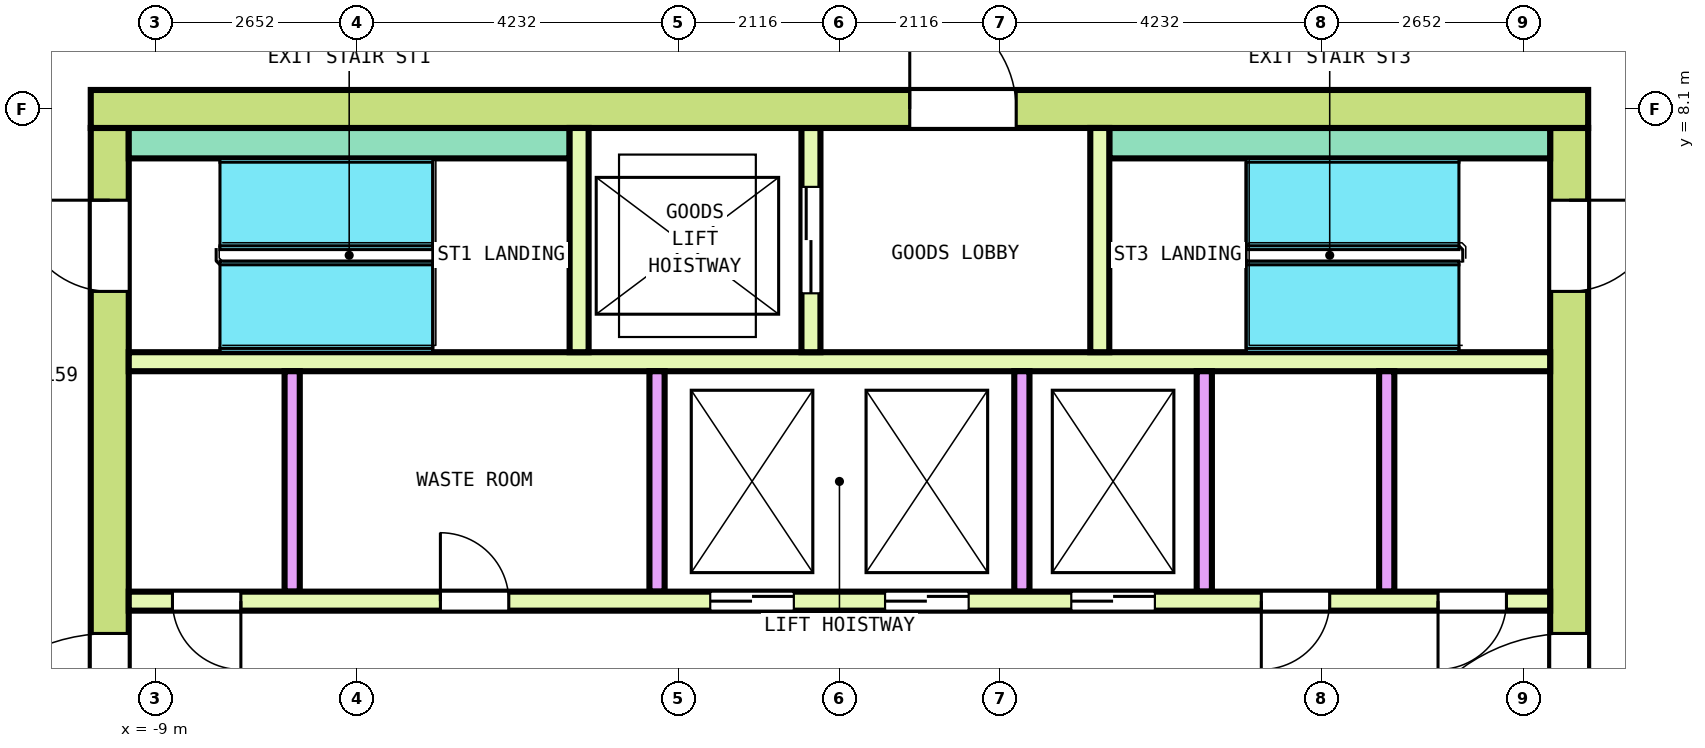
"""IFC4 building model, lengths in metres.
Left out: names, types, materials, properties, quantities, classifications, styles, units other than length and angle.
Written with IfcOpenShell. Run it as: python <this file> out.ifc"""

import sys

from ifc_helpers import new_model, si_unit, direction, frame, frame_2d, origin, place, context, subcontext, project, spatial, rectangle, extrude, element, fill, save


model = new_model("IFC4")
c1 = context("Model", 3, precision=1e-05, world=origin(), true_north=direction((0.0, 1.0)))
c2 = subcontext(c1, "Body", "Model", "MODEL_VIEW")
j1 = project(units=[si_unit("LENGTHUNIT", "METRE"), si_unit("PLANEANGLEUNIT", "RADIAN")], contexts=[c1])
p1 = place(None, origin())
s1 = spatial("IfcSite", under=j1, at=p1, CompositionType="ELEMENT")
p2 = place(p1, origin())
s2 = spatial("IfcBuilding", under=s1, at=p2, CompositionType="ELEMENT")
p3 = place(p2, frame((0.0, 0.0, 275.0)))
s3 = spatial("IfcBuildingStorey", under=s2, at=p3, CompositionType="ELEMENT", Elevation=275.0)
p4 = place(p3, frame((-9.85, 8.1, 0.0), z_axis=(0.0, 0.0, 1.0), x_axis=(1.0, 0.0, 0.0)))
e1 = element("IfcWall", 1, at=p4, inside=s3, PredefinedType="SHEAR", context=c2, shape_type="SweptSolid", body=[
    extrude(rectangle(XDim=19.7, YDim=0.5, at=frame_2d((9.85, 0.0))), origin(), (0.0, 0.0, 1.0), 3.7),
])
p5 = place(p4, frame((10.775, 0.0, 0.0)))
e2 = element("IfcOpeningElement", 2, at=p5, cuts=e1, PredefinedType="OPENING", context=c2, shape_type="SweptSolid", body=[
    extrude(rectangle(XDim=1.4, YDim=2.1, at=frame_2d((0.7, 1.05))), frame((0.0, 0.26, 0.0), z_axis=(0.0, -1.0, 0.0), x_axis=(1.0, 0.0, 0.0)), (0.0, 0.0, 1.0), 0.52),
])
p6 = place(p3, frame((-9.6, -7.85, 0.0), z_axis=(0.0, 0.0, 1.0), x_axis=(0.0, 1.0, 0.0)))
e3 = element("IfcWall", 3, at=p6, inside=s3, PredefinedType="SHEAR", context=c2, shape_type="SweptSolid", body=[
    extrude(rectangle(XDim=15.7, YDim=0.5, at=frame_2d((7.85, 0.0))), origin(), (0.0, 0.0, 1.0), 3.7),
])
p7 = place(p6, frame((6.65, 0.0, 0.0)))
e4 = element("IfcOpeningElement", 4, at=p7, cuts=e3, PredefinedType="OPENING", context=c2, shape_type="SweptSolid", body=[
    extrude(rectangle(XDim=2.4, YDim=2.1, at=frame_2d((1.2, 1.05))), frame((0.0, 0.26, 0.0), z_axis=(0.0, -1.0, 0.0), x_axis=(1.0, 0.0, 0.0)), (0.0, 0.0, 1.0), 0.52),
])
p8 = place(p6, frame((13.55, 0.0, 0.0)))
e5 = element("IfcOpeningElement", 5, at=p8, cuts=e3, PredefinedType="OPENING", context=c2, shape_type="SweptSolid", body=[
    extrude(rectangle(XDim=1.2, YDim=2.1, at=frame_2d((0.6, 1.05))), frame((0.0, 0.26, 0.0), z_axis=(0.0, -1.0, 0.0), x_axis=(1.0, 0.0, 0.0)), (0.0, 0.0, 1.0), 0.52),
])
p9 = place(p6, frame((0.95, 0.0, 0.0)))
e6 = element("IfcOpeningElement", 6, at=p9, cuts=e3, PredefinedType="OPENING", context=c2, shape_type="SweptSolid", body=[
    extrude(rectangle(XDim=1.2, YDim=2.1, at=frame_2d((0.6, 1.05))), frame((0.0, 0.26, 0.0), z_axis=(0.0, -1.0, 0.0), x_axis=(1.0, 0.0, 0.0)), (0.0, 0.0, 1.0), 0.52),
])
p10 = place(p3, frame((9.6, -7.85, 0.0), z_axis=(0.0, 0.0, 1.0), x_axis=(0.0, 1.0, 0.0)))
e7 = element("IfcWall", 7, at=p10, inside=s3, PredefinedType="SHEAR", context=c2, shape_type="SweptSolid", body=[
    extrude(rectangle(XDim=15.7, YDim=0.5, at=frame_2d((7.85, 0.0))), origin(), (0.0, 0.0, 1.0), 3.7),
])
p11 = place(p10, frame((6.65, 0.0, 0.0)))
e8 = element("IfcOpeningElement", 8, at=p11, cuts=e7, PredefinedType="OPENING", context=c2, shape_type="SweptSolid", body=[
    extrude(rectangle(XDim=2.4, YDim=2.1, at=frame_2d((1.2, 1.05))), frame((0.0, 0.26, 0.0), z_axis=(0.0, -1.0, 0.0), x_axis=(1.0, 0.0, 0.0)), (0.0, 0.0, 1.0), 0.52),
])
p12 = place(p10, frame((13.55, 0.0, 0.0)))
e9 = element("IfcOpeningElement", 9, at=p12, cuts=e7, PredefinedType="OPENING", context=c2, shape_type="SweptSolid", body=[
    extrude(rectangle(XDim=1.2, YDim=2.1, at=frame_2d((0.6, 1.05))), frame((0.0, 0.26, 0.0), z_axis=(0.0, -1.0, 0.0), x_axis=(1.0, 0.0, 0.0)), (0.0, 0.0, 1.0), 0.52),
])
p13 = place(p10, frame((1.05, 0.0, 0.0)))
e10 = element("IfcOpeningElement", 10, at=p13, cuts=e7, PredefinedType="OPENING", context=c2, shape_type="SweptSolid", body=[
    extrude(rectangle(XDim=1.0, YDim=2.1, at=frame_2d((0.5, 1.05))), frame((0.0, 0.26, 0.0), z_axis=(0.0, -1.0, 0.0), x_axis=(1.0, 0.0, 0.0)), (0.0, 0.0, 1.0), 0.52),
])
p14 = place(p3, frame((-9.35, 1.625, 0.0), z_axis=(0.0, 0.0, 1.0), x_axis=(1.0, 0.0, 0.0)))
e11 = element("IfcWall", 11, at=p14, inside=s3, PredefinedType="SOLIDWALL", context=c2, shape_type="SweptSolid", body=[
    extrude(rectangle(XDim=18.7, YDim=0.25, at=frame_2d((9.35, 0.0))), origin(), (0.0, 0.0, 1.0), 3.7),
])
p15 = place(p14, frame((7.65, 0.0, 0.0)))
e12 = element("IfcOpeningElement", 12, at=p15, cuts=e11, PredefinedType="OPENING", context=c2, shape_type="SweptSolid", body=[
    extrude(rectangle(XDim=1.1, YDim=2.1, at=frame_2d((0.55, 1.05))), frame((0.0, 0.135, 0.0), z_axis=(0.0, -1.0, 0.0), x_axis=(1.0, 0.0, 0.0)), (0.0, 0.0, 1.0), 0.27),
])
p16 = place(p14, frame((9.95, 0.0, 0.0)))
e13 = element("IfcOpeningElement", 13, at=p16, cuts=e11, PredefinedType="OPENING", context=c2, shape_type="SweptSolid", body=[
    extrude(rectangle(XDim=1.1, YDim=2.1, at=frame_2d((0.55, 1.05))), frame((0.0, 0.135, 0.0), z_axis=(0.0, -1.0, 0.0), x_axis=(1.0, 0.0, 0.0)), (0.0, 0.0, 1.0), 0.27),
])
p17 = place(p14, frame((12.4, 0.0, 0.0)))
e14 = element("IfcOpeningElement", 14, at=p17, cuts=e11, PredefinedType="OPENING", context=c2, shape_type="SweptSolid", body=[
    extrude(rectangle(XDim=1.1, YDim=2.1, at=frame_2d((0.55, 1.05))), frame((0.0, 0.135, 0.0), z_axis=(0.0, -1.0, 0.0), x_axis=(1.0, 0.0, 0.0)), (0.0, 0.0, 1.0), 0.27),
])
p18 = place(p14, frame((0.575, 0.0, 0.0)))
e15 = element("IfcOpeningElement", 15, at=p18, cuts=e11, PredefinedType="OPENING", context=c2, shape_type="SweptSolid", body=[
    extrude(rectangle(XDim=0.9, YDim=2.1, at=frame_2d((0.45, 1.05))), frame((0.0, 0.135, 0.0), z_axis=(0.0, -1.0, 0.0), x_axis=(1.0, 0.0, 0.0)), (0.0, 0.0, 1.0), 0.27),
])
p19 = place(p14, frame((4.1, 0.0, 0.0)))
e16 = element("IfcOpeningElement", 16, at=p19, cuts=e11, PredefinedType="OPENING", context=c2, shape_type="SweptSolid", body=[
    extrude(rectangle(XDim=0.9, YDim=2.1, at=frame_2d((0.45, 1.05))), frame((0.0, 0.135, 0.0), z_axis=(0.0, -1.0, 0.0), x_axis=(1.0, 0.0, 0.0)), (0.0, 0.0, 1.0), 0.27),
])
p20 = place(p14, frame((14.9, 0.0, 0.0)))
e17 = element("IfcOpeningElement", 17, at=p20, cuts=e11, PredefinedType="OPENING", context=c2, shape_type="SweptSolid", body=[
    extrude(rectangle(XDim=0.9, YDim=2.1, at=frame_2d((0.45, 1.05))), frame((0.0, 0.135, 0.0), z_axis=(0.0, -1.0, 0.0), x_axis=(1.0, 0.0, 0.0)), (0.0, 0.0, 1.0), 0.27),
])
p21 = place(p14, frame((17.225, 0.0, 0.0)))
e18 = element("IfcOpeningElement", 18, at=p21, cuts=e11, PredefinedType="OPENING", context=c2, shape_type="SweptSolid", body=[
    extrude(rectangle(XDim=0.9, YDim=2.1, at=frame_2d((0.45, 1.05))), frame((0.0, 0.135, 0.0), z_axis=(0.0, -1.0, 0.0), x_axis=(1.0, 0.0, 0.0)), (0.0, 0.0, 1.0), 0.27),
])
p22 = place(p3, frame((-9.35, 4.775, 0.0), z_axis=(0.0, 0.0, 1.0), x_axis=(1.0, 0.0, 0.0)))
e19 = element("IfcWall", 19, at=p22, inside=s3, PredefinedType="SOLIDWALL", context=c2, shape_type="SweptSolid", body=[
    extrude(rectangle(XDim=18.7, YDim=0.25, at=frame_2d((9.35, 0.0))), origin(), (0.0, 0.0, 1.0), 3.7),
])
for number, where, z_axis, x_axis in (
    (20, (-7.2, 1.75, 0.0), (0.0, 0.0, 1.0), (0.0, 1.0, 0.0)),
    (21, (-2.4, 1.75, 0.0), (0.0, 0.0, 1.0), (0.0, 1.0, 0.0)),
    (22, (2.4, 1.75, 0.0), (0.0, 0.0, 1.0), (0.0, 1.0, 0.0)),
    (23, (4.8, 1.75, 0.0), (0.0, 0.0, 1.0), (0.0, 1.0, 0.0)),
    (24, (7.2, 1.75, 0.0), (0.0, 0.0, 1.0), (0.0, 1.0, 0.0)),
):
    element("IfcWall", number, at=place(p3, frame(where, z_axis=z_axis, x_axis=x_axis)), inside=s3, PredefinedType="SOLIDWALL", context=c2, shape_type="SweptSolid", body=[
        extrude(rectangle(XDim=2.9, YDim=0.2, at=frame_2d((1.45, 0.0))), origin(), (0.0, 0.0, 1.0), 3.7),
    ])
for number, where, z_axis, x_axis in (
    (25, (-9.35, 7.65, 0.0), (0.0, 0.0, 1.0), (1.0, 0.0, 0.0)),
    (26, (3.55, 7.65, 0.0), (0.0, 0.0, 1.0), (1.0, 0.0, 0.0)),
):
    element("IfcWall", number, at=place(p3, frame(where, z_axis=z_axis, x_axis=x_axis)), inside=s3, PredefinedType="SOLIDWALL", context=c2, shape_type="SweptSolid", body=[
        extrude(rectangle(XDim=5.8, YDim=0.4, at=frame_2d((2.9, 0.0))), origin(), (0.0, 0.0, 1.0), 3.7),
    ])
p23 = place(p3, frame((-3.425, 4.9, 0.0), z_axis=(0.0, 0.0, 1.0), x_axis=(0.0, 1.0, 0.0)))
e27 = element("IfcWall", 27, at=p23, inside=s3, PredefinedType="SOLIDWALL", context=c2, shape_type="SweptSolid", body=[
    extrude(rectangle(XDim=2.95, YDim=0.25, at=frame_2d((1.475, 0.0))), origin(), (0.0, 0.0, 1.0), 3.7),
])
p24 = place(p3, frame((-0.375, 4.9, 0.0), z_axis=(0.0, 0.0, 1.0), x_axis=(0.0, 1.0, 0.0)))
e28 = element("IfcWall", 28, at=p24, inside=s3, PredefinedType="SOLIDWALL", context=c2, shape_type="SweptSolid", body=[
    extrude(rectangle(XDim=2.95, YDim=0.25, at=frame_2d((1.475, 0.0))), origin(), (0.0, 0.0, 1.0), 3.7),
])
p25 = place(p24, frame((0.775, 0.0, 0.0)))
e29 = element("IfcOpeningElement", 29, at=p25, cuts=e28, PredefinedType="OPENING", context=c2, shape_type="SweptSolid", body=[
    extrude(rectangle(XDim=1.4, YDim=2.1, at=frame_2d((0.7, 1.05))), frame((0.0, 0.135, 0.0), z_axis=(0.0, -1.0, 0.0), x_axis=(1.0, 0.0, 0.0)), (0.0, 0.0, 1.0), 0.27),
])
p26 = place(p3, frame((3.425, 4.9, 0.0), z_axis=(0.0, 0.0, 1.0), x_axis=(0.0, 1.0, 0.0)))
e30 = element("IfcWall", 30, at=p26, inside=s3, PredefinedType="SOLIDWALL", context=c2, shape_type="SweptSolid", body=[
    extrude(rectangle(XDim=2.95, YDim=0.25, at=frame_2d((1.475, 0.0))), origin(), (0.0, 0.0, 1.0), 3.7),
])
p27 = place(p15, origin())
e31 = element("IfcDoor", 31, at=p27, inside=s3, OperationType="DOUBLE_DOOR_SLIDING", PredefinedType="DOOR", context=c2, shape_type="SweptSolid", body=[
    extrude(rectangle(XDim=1.1, YDim=2.1, at=frame_2d((0.55, 1.05))), frame((0.0, 0.075, 0.0), z_axis=(0.0, -1.0, 0.0), x_axis=(1.0, 0.0, 0.0)), (0.0, 0.0, 1.0), 0.15),
])
fill(e12, e31)
p28 = place(p16, origin())
e32 = element("IfcDoor", 32, at=p28, inside=s3, OperationType="DOUBLE_DOOR_SLIDING", PredefinedType="DOOR", context=c2, shape_type="SweptSolid", body=[
    extrude(rectangle(XDim=1.1, YDim=2.1, at=frame_2d((0.55, 1.05))), frame((0.0, 0.075, 0.0), z_axis=(0.0, -1.0, 0.0), x_axis=(1.0, 0.0, 0.0)), (0.0, 0.0, 1.0), 0.15),
])
fill(e13, e32)
p29 = place(p17, origin())
e33 = element("IfcDoor", 33, at=p29, inside=s3, OperationType="DOUBLE_DOOR_SLIDING", PredefinedType="DOOR", context=c2, shape_type="SweptSolid", body=[
    extrude(rectangle(XDim=1.1, YDim=2.1, at=frame_2d((0.55, 1.05))), frame((0.0, 0.075, 0.0), z_axis=(0.0, -1.0, 0.0), x_axis=(1.0, 0.0, 0.0)), (0.0, 0.0, 1.0), 0.15),
])
fill(e14, e33)
p30 = place(p25, origin())
e34 = element("IfcDoor", 34, at=p30, inside=s3, OperationType="DOUBLE_DOOR_SLIDING", PredefinedType="DOOR", context=c2, shape_type="SweptSolid", body=[
    extrude(rectangle(XDim=1.4, YDim=2.1, at=frame_2d((0.7, 1.05))), frame((0.0, 0.075, 0.0), z_axis=(0.0, -1.0, 0.0), x_axis=(1.0, 0.0, 0.0)), (0.0, 0.0, 1.0), 0.15),
])
fill(e29, e34)
p31 = place(p7, origin())
e35 = element("IfcDoor", 35, at=p31, inside=s3, OperationType="DOUBLE_DOOR_SINGLE_SWING", PredefinedType="DOOR", context=c2, shape_type="SweptSolid", body=[
    extrude(rectangle(XDim=2.4, YDim=2.1, at=frame_2d((1.2, 1.05))), frame((0.0, 0.2, 0.0), z_axis=(0.0, -1.0, 0.0), x_axis=(1.0, 0.0, 0.0)), (0.0, 0.0, 1.0), 0.4),
])
fill(e4, e35)
p32 = place(p11, origin())
e36 = element("IfcDoor", 36, at=p32, inside=s3, OperationType="DOUBLE_DOOR_SINGLE_SWING", PredefinedType="DOOR", context=c2, shape_type="SweptSolid", body=[
    extrude(rectangle(XDim=2.4, YDim=2.1, at=frame_2d((1.2, 1.05))), frame((0.0, 0.2, 0.0), z_axis=(0.0, -1.0, 0.0), x_axis=(1.0, 0.0, 0.0)), (0.0, 0.0, 1.0), 0.4),
])
fill(e8, e36)
p33 = place(p8, origin())
e37 = element("IfcDoor", 37, at=p33, inside=s3, OperationType="SINGLE_SWING_RIGHT", PredefinedType="DOOR", context=c2, shape_type="SweptSolid", body=[
    extrude(rectangle(XDim=1.2, YDim=2.1, at=frame_2d((0.6, 1.05))), frame((0.0, 0.2, 0.0), z_axis=(0.0, -1.0, 0.0), x_axis=(1.0, 0.0, 0.0)), (0.0, 0.0, 1.0), 0.4),
])
fill(e5, e37)
p34 = place(p12, origin())
e38 = element("IfcDoor", 38, at=p34, inside=s3, OperationType="SINGLE_SWING_RIGHT", PredefinedType="DOOR", context=c2, shape_type="SweptSolid", body=[
    extrude(rectangle(XDim=1.2, YDim=2.1, at=frame_2d((0.6, 1.05))), frame((0.0, 0.2, 0.0), z_axis=(0.0, -1.0, 0.0), x_axis=(1.0, 0.0, 0.0)), (0.0, 0.0, 1.0), 0.4),
])
fill(e9, e38)
p35 = place(p5, origin())
e39 = element("IfcDoor", 39, at=p35, inside=s3, OperationType="DOUBLE_DOOR_SINGLE_SWING", PredefinedType="DOOR", context=c2, shape_type="SweptSolid", body=[
    extrude(rectangle(XDim=1.4, YDim=2.1, at=frame_2d((0.7, 1.05))), frame((0.0, 0.2, 0.0), z_axis=(0.0, -1.0, 0.0), x_axis=(1.0, 0.0, 0.0)), (0.0, 0.0, 1.0), 0.4),
])
fill(e2, e39)
p36 = place(p18, origin())
e40 = element("IfcDoor", 40, at=p36, inside=s3, OperationType="SINGLE_SWING_RIGHT", PredefinedType="DOOR", context=c2, shape_type="SweptSolid", body=[
    extrude(rectangle(XDim=0.9, YDim=2.1, at=frame_2d((0.45, 1.05))), frame((0.0, 0.075, 0.0), z_axis=(0.0, -1.0, 0.0), x_axis=(1.0, 0.0, 0.0)), (0.0, 0.0, 1.0), 0.15),
])
fill(e15, e40)
p37 = place(p19, origin())
e41 = element("IfcDoor", 41, at=p37, inside=s3, OperationType="SINGLE_SWING_LEFT", PredefinedType="DOOR", context=c2, shape_type="SweptSolid", body=[
    extrude(rectangle(XDim=0.9, YDim=2.1, at=frame_2d((0.45, 1.05))), frame((0.0, 0.075, 0.0), z_axis=(0.0, -1.0, 0.0), x_axis=(1.0, 0.0, 0.0)), (0.0, 0.0, 1.0), 0.15),
])
fill(e16, e41)
p38 = place(p20, origin())
e42 = element("IfcDoor", 42, at=p38, inside=s3, OperationType="SINGLE_SWING_RIGHT", PredefinedType="DOOR", context=c2, shape_type="SweptSolid", body=[
    extrude(rectangle(XDim=0.9, YDim=2.1, at=frame_2d((0.45, 1.05))), frame((0.0, 0.075, 0.0), z_axis=(0.0, -1.0, 0.0), x_axis=(1.0, 0.0, 0.0)), (0.0, 0.0, 1.0), 0.15),
])
fill(e17, e42)
p39 = place(p21, origin())
e43 = element("IfcDoor", 43, at=p39, inside=s3, OperationType="SINGLE_SWING_LEFT", PredefinedType="DOOR", context=c2, shape_type="SweptSolid", body=[
    extrude(rectangle(XDim=0.9, YDim=2.1, at=frame_2d((0.45, 1.05))), frame((0.0, 0.075, 0.0), z_axis=(0.0, -1.0, 0.0), x_axis=(1.0, 0.0, 0.0)), (0.0, 0.0, 1.0), 0.15),
])
fill(e18, e43)
save(model, sys.argv[1])
